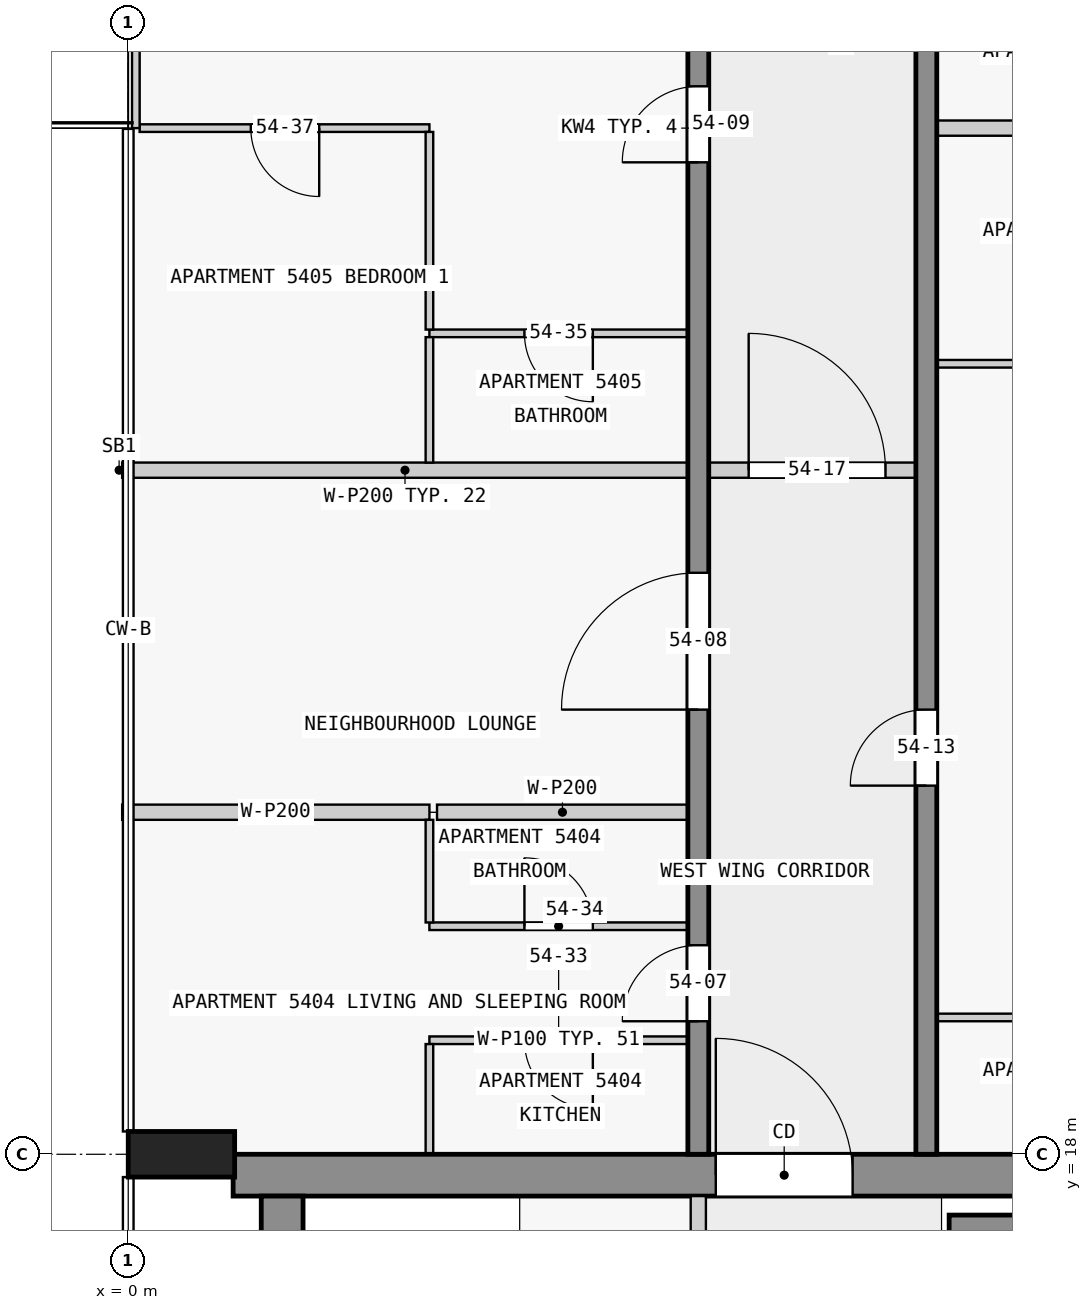
"""IFC4 building model, lengths in metres.
Left out: names, types, materials, properties, quantities, classifications, styles, units other than length and angle.
Written with IfcOpenShell. Run it as: python <this file> out.ifc"""

import sys

from ifc_helpers import new_model, si_unit, direction, frame, frame_2d, origin, origin_2d, place, context, subcontext, project, spatial, rectangle, extrude, element, fill, save


model = new_model("IFC4")
c1 = context("Model", 3, precision=1e-05, world=origin(), true_north=direction((0.0, 1.0)))
c2 = subcontext(c1, "Body", "Model", "MODEL_VIEW")
j1 = project(units=[si_unit("LENGTHUNIT", "METRE"), si_unit("PLANEANGLEUNIT", "RADIAN")], contexts=[c1])
p1 = place(None, origin())
s1 = spatial("IfcSite", under=j1, at=p1, CompositionType="ELEMENT")
p2 = place(p1, origin())
s2 = spatial("IfcBuilding", under=s1, at=p2, CompositionType="ELEMENT")
p3 = place(p2, frame((0.0, 0.0, 208.4)))
s3 = spatial("IfcBuildingStorey", under=s2, at=p3, CompositionType="ELEMENT", Elevation=208.4)
p4 = place(p3, frame((0.7, 18.0, 0.0), z_axis=(0.0, 0.0, 1.0), x_axis=(0.0, 1.0, 0.0)))
e1 = element("IfcColumn", 1, at=p4, inside=s3, PredefinedType="COLUMN", context=c2, shape_type="SweptSolid", body=[
    extrude(rectangle(XDim=0.6, YDim=1.4, at=origin_2d()), origin(), (0.0, 0.0, 1.0), 3.5),
])
p5 = place(p3, frame((1.38, 17.725, 0.0), z_axis=(0.0, 0.0, 1.0), x_axis=(1.0, 0.0, 0.0)))
e2 = element("IfcWall", 2, at=p5, inside=s3, PredefinedType="SHEAR", context=c2, shape_type="SweptSolid", body=[
    extrude(rectangle(XDim=21.12, YDim=0.55, at=frame_2d((10.56, 0.0))), origin(), (0.0, 0.0, 1.0), 3.25),
])
p6 = place(p5, frame((6.35, 0.0, 0.0)))
e3 = element("IfcOpeningElement", 3, at=p6, cuts=e2, PredefinedType="OPENING", context=c2, shape_type="SweptSolid", body=[
    extrude(rectangle(XDim=1.8, YDim=2.1, at=frame_2d((0.9, 1.05))), frame((0.0, 0.285, 0.0), z_axis=(0.0, -1.0, 0.0), x_axis=(1.0, 0.0, 0.0)), (0.0, 0.0, 1.0), 0.57),
])
p7 = place(p3, frame((2.025, 2.5, 0.0), z_axis=(0.0, 0.0, 1.0), x_axis=(0.0, 1.0, 0.0)))
e4 = element("IfcWall", 4, at=p7, inside=s3, PredefinedType="SHEAR", context=c2, shape_type="SweptSolid", body=[
    extrude(rectangle(XDim=14.95, YDim=0.55, at=frame_2d((7.475, 0.0))), origin(), (0.0, 0.0, 1.0), 3.25),
])
p8 = place(p3, frame((10.8, 17.05, 0.0), z_axis=(0.0, 0.0, 1.0), x_axis=(1.0, 0.0, 0.0)))
e5 = element("IfcWall", 5, at=p8, inside=s3, PredefinedType="SHEAR", context=c2, shape_type="SweptSolid", body=[
    extrude(rectangle(XDim=7.8, YDim=0.3, at=frame_2d((3.9, 0.0))), origin(), (0.0, 0.0, 1.0), 3.25),
])
p9 = place(p3, frame((7.5, 18.0, 0.0), z_axis=(0.0, 0.0, 1.0), x_axis=(0.0, 1.0, 0.0)))
e6 = element("IfcWall", 6, at=p9, inside=s3, PredefinedType="SHEAR", context=c2, shape_type="SweptSolid", body=[
    extrude(rectangle(XDim=27.0, YDim=0.275, at=frame_2d((13.5, 0.0))), origin(), (0.0, 0.0, 1.0), 3.25),
])
p10 = place(p9, frame((1.75, 0.0, 0.0)))
e7 = element("IfcOpeningElement", 7, at=p10, cuts=e6, PredefinedType="OPENING", context=c2, shape_type="SweptSolid", body=[
    extrude(rectangle(XDim=1.0, YDim=2.1, at=frame_2d((0.5, 1.05))), frame((0.0, 0.147, 0.0), z_axis=(0.0, -1.0, 0.0), x_axis=(1.0, 0.0, 0.0)), (0.0, 0.0, 1.0), 0.295),
])
p11 = place(p9, frame((5.85, 0.0, 0.0)))
e8 = element("IfcOpeningElement", 8, at=p11, cuts=e6, PredefinedType="OPENING", context=c2, shape_type="SweptSolid", body=[
    extrude(rectangle(XDim=1.8, YDim=2.1, at=frame_2d((0.9, 1.05))), frame((0.0, 0.147, 0.0), z_axis=(0.0, -1.0, 0.0), x_axis=(1.0, 0.0, 0.0)), (0.0, 0.0, 1.0), 0.295),
])
p12 = place(p9, frame((13.05, 0.0, 0.0)))
e9 = element("IfcOpeningElement", 9, at=p12, cuts=e6, PredefinedType="OPENING", context=c2, shape_type="SweptSolid", body=[
    extrude(rectangle(XDim=1.0, YDim=2.1, at=frame_2d((0.5, 1.05))), frame((0.0, 0.147, 0.0), z_axis=(0.0, -1.0, 0.0), x_axis=(1.0, 0.0, 0.0)), (0.0, 0.0, 1.0), 0.295),
])
p13 = place(p9, frame((19.75, 0.0, 0.0)))
e10 = element("IfcOpeningElement", 10, at=p13, cuts=e6, PredefinedType="OPENING", context=c2, shape_type="SweptSolid", body=[
    extrude(rectangle(XDim=1.0, YDim=2.1, at=frame_2d((0.5, 1.05))), frame((0.0, 0.147, 0.0), z_axis=(0.0, -1.0, 0.0), x_axis=(1.0, 0.0, 0.0)), (0.0, 0.0, 1.0), 0.295),
])
p14 = place(p9, frame((23.25, 0.0, 0.0)))
e11 = element("IfcOpeningElement", 11, at=p14, cuts=e6, PredefinedType="OPENING", context=c2, shape_type="SweptSolid", body=[
    extrude(rectangle(XDim=0.9, YDim=2.1, at=frame_2d((0.45, 1.05))), frame((0.0, 0.147, 0.0), z_axis=(0.0, -1.0, 0.0), x_axis=(1.0, 0.0, 0.0)), (0.0, 0.0, 1.0), 0.295),
])
p15 = place(p9, frame((25.45, 0.0, 0.0)))
e12 = element("IfcOpeningElement", 12, at=p15, cuts=e6, PredefinedType="OPENING", context=c2, shape_type="SweptSolid", body=[
    extrude(rectangle(XDim=1.0, YDim=2.1, at=frame_2d((0.5, 1.05))), frame((0.0, 0.147, 0.0), z_axis=(0.0, -1.0, 0.0), x_axis=(1.0, 0.0, 0.0)), (0.0, 0.0, 1.0), 0.295),
])
p16 = place(p3, frame((10.5, 18.0, 0.0), z_axis=(0.0, 0.0, 1.0), x_axis=(0.0, 1.0, 0.0)))
e13 = element("IfcWall", 13, at=p16, inside=s3, PredefinedType="SHEAR", context=c2, shape_type="SweptSolid", body=[
    extrude(rectangle(XDim=27.0, YDim=0.275, at=frame_2d((13.5, 0.0))), origin(), (0.0, 0.0, 1.0), 3.25),
])
p17 = place(p16, frame((4.85, 0.0, 0.0)))
e14 = element("IfcOpeningElement", 14, at=p17, cuts=e13, PredefinedType="OPENING", context=c2, shape_type="SweptSolid", body=[
    extrude(rectangle(XDim=1.0, YDim=2.1, at=frame_2d((0.5, 1.05))), frame((0.0, 0.147, 0.0), z_axis=(0.0, -1.0, 0.0), x_axis=(1.0, 0.0, 0.0)), (0.0, 0.0, 1.0), 0.295),
])
p18 = place(p16, frame((15.25, 0.0, 0.0)))
e15 = element("IfcOpeningElement", 15, at=p18, cuts=e13, PredefinedType="OPENING", context=c2, shape_type="SweptSolid", body=[
    extrude(rectangle(XDim=1.0, YDim=2.1, at=frame_2d((0.5, 1.05))), frame((0.0, 0.147, 0.0), z_axis=(0.0, -1.0, 0.0), x_axis=(1.0, 0.0, 0.0)), (0.0, 0.0, 1.0), 0.295),
])
p19 = place(p16, frame((21.35, 0.0, 0.0)))
e16 = element("IfcOpeningElement", 16, at=p19, cuts=e13, PredefinedType="OPENING", context=c2, shape_type="SweptSolid", body=[
    extrude(rectangle(XDim=1.0, YDim=2.1, at=frame_2d((0.5, 1.05))), frame((0.0, 0.147, 0.0), z_axis=(0.0, -1.0, 0.0), x_axis=(1.0, 0.0, 0.0)), (0.0, 0.0, 1.0), 0.295),
])
p20 = place(p3, frame((0.1, 31.5, 0.0), z_axis=(0.0, 0.0, 1.0), x_axis=(0.0, 1.0, 0.0)))
e17 = element("IfcWall", 17, at=p20, inside=s3, PredefinedType="STANDARD", context=c2, shape_type="SweptSolid", body=[
    extrude(rectangle(XDim=4.5, YDim=0.1, at=frame_2d((2.25, 0.0))), origin(), (0.0, 0.0, 1.0), 3.25),
])
p21 = place(p20, frame((1.05, 0.0, 0.0)))
e18 = element("IfcOpeningElement", 18, at=p21, cuts=e17, PredefinedType="OPENING", context=c2, shape_type="SweptSolid", body=[
    extrude(rectangle(XDim=2.4, YDim=2.4, at=frame_2d((1.2, 1.2))), frame((0.0, 0.06, 0.0), z_axis=(0.0, -1.0, 0.0), x_axis=(1.0, 0.0, 0.0)), (0.0, 0.0, 1.0), 0.12),
])
p22 = place(p3, frame((7.5, 10.1, 0.0), z_axis=(0.0, 0.0, 1.0), x_axis=(0.0, 1.0, 0.0)))
e19 = element("IfcWall", 19, at=p22, inside=s3, PredefinedType="PARTITIONING", context=c2, shape_type="SweptSolid", body=[
    extrude(rectangle(XDim=7.35, YDim=0.2, at=frame_2d((3.675, 0.0))), origin(), (0.0, 0.0, 1.0), 3.25),
])
p23 = place(p22, frame((0.75, 0.0, 0.0)))
e20 = element("IfcOpeningElement", 20, at=p23, cuts=e19, PredefinedType="OPENING", context=c2, shape_type="SweptSolid", body=[
    extrude(rectangle(XDim=0.9, YDim=2.1, at=frame_2d((0.45, 1.05))), frame((0.0, 0.11, 0.0), z_axis=(0.0, -1.0, 0.0), x_axis=(1.0, 0.0, 0.0)), (0.0, 0.0, 1.0), 0.22),
])
p24 = place(p22, frame((4.425, 0.0, 0.0)))
e21 = element("IfcOpeningElement", 21, at=p24, cuts=e19, PredefinedType="OPENING", context=c2, shape_type="SweptSolid", body=[
    extrude(rectangle(XDim=0.9, YDim=2.1, at=frame_2d((0.45, 1.05))), frame((0.0, 0.11, 0.0), z_axis=(0.0, -1.0, 0.0), x_axis=(1.0, 0.0, 0.0)), (0.0, 0.0, 1.0), 0.22),
])
p25 = place(p3, frame((7.363, 19.5, 0.0), z_axis=(0.0, 0.0, 1.0), x_axis=(-1.0, 0.0, 0.0)))
e22 = element("IfcWall", 22, at=p25, inside=s3, PredefinedType="PARTITIONING", context=c2, shape_type="SweptSolid", body=[
    extrude(rectangle(XDim=3.4, YDim=0.1, at=frame_2d((1.7, 0.0))), origin(), (0.0, 0.0, 1.0), 3.25),
])
p26 = place(p25, frame((1.25, 0.0, 0.0)))
e23 = element("IfcOpeningElement", 23, at=p26, cuts=e22, PredefinedType="OPENING", context=c2, shape_type="SweptSolid", body=[
    extrude(rectangle(XDim=0.9, YDim=2.1, at=frame_2d((0.45, 1.05))), frame((0.0, 0.06, 0.0), z_axis=(0.0, -1.0, 0.0), x_axis=(1.0, 0.0, 0.0)), (0.0, 0.0, 1.0), 0.12),
])
p27 = place(p3, frame((14.038, 19.8, 0.0), z_axis=(0.0, 0.0, 1.0), x_axis=(-1.0, 0.0, 0.0)))
e24 = element("IfcWall", 24, at=p27, inside=s3, PredefinedType="PARTITIONING", context=c2, shape_type="SweptSolid", body=[
    extrude(rectangle(XDim=3.4, YDim=0.1, at=frame_2d((1.7, 0.0))), origin(), (0.0, 0.0, 1.0), 3.25),
])
p28 = place(p27, frame((1.25, 0.0, 0.0)))
e25 = element("IfcOpeningElement", 25, at=p28, cuts=e24, PredefinedType="OPENING", context=c2, shape_type="SweptSolid", body=[
    extrude(rectangle(XDim=0.9, YDim=2.1, at=frame_2d((0.45, 1.05))), frame((0.0, 0.06, 0.0), z_axis=(0.0, -1.0, 0.0), x_axis=(1.0, 0.0, 0.0)), (0.0, 0.0, 1.0), 0.12),
])
p29 = place(p3, frame((3.962, 21.0, 0.0), z_axis=(0.0, 0.0, 1.0), x_axis=(1.0, 0.0, 0.0)))
e26 = element("IfcWall", 26, at=p29, inside=s3, PredefinedType="PARTITIONING", context=c2, shape_type="SweptSolid", body=[
    extrude(rectangle(XDim=3.4, YDim=0.1, at=frame_2d((1.7, 0.0))), origin(), (0.0, 0.0, 1.0), 3.25),
])
p30 = place(p29, frame((1.25, 0.0, 0.0)))
e27 = element("IfcOpeningElement", 27, at=p30, cuts=e26, PredefinedType="OPENING", context=c2, shape_type="SweptSolid", body=[
    extrude(rectangle(XDim=0.9, YDim=2.1, at=frame_2d((0.45, 1.05))), frame((0.0, 0.06, 0.0), z_axis=(0.0, -1.0, 0.0), x_axis=(1.0, 0.0, 0.0)), (0.0, 0.0, 1.0), 0.12),
])
p31 = place(p3, frame((7.363, 22.5, 0.0), z_axis=(0.0, 0.0, 1.0), x_axis=(-1.0, 0.0, 0.0)))
e28 = element("IfcWall", 28, at=p31, inside=s3, PredefinedType="PARTITIONING", context=c2, shape_type="SweptSolid", body=[
    extrude(rectangle(XDim=3.3, YDim=0.2, at=frame_2d((1.65, 0.0))), origin(), (0.0, 0.0, 1.0), 3.25),
])
p32 = place(p3, frame((-0.08, 22.5, 0.0), z_axis=(0.0, 0.0, 1.0), x_axis=(1.0, 0.0, 0.0)))
e29 = element("IfcWall", 29, at=p32, inside=s3, PredefinedType="PARTITIONING", context=c2, shape_type="SweptSolid", body=[
    extrude(rectangle(XDim=4.042, YDim=0.2, at=frame_2d((2.021, 0.0))), origin(), (0.0, 0.0, 1.0), 3.25),
])
p33 = place(p3, frame((7.363, 27.0, 0.0), z_axis=(0.0, 0.0, 1.0), x_axis=(-1.0, 0.0, 0.0)))
e30 = element("IfcWall", 30, at=p33, inside=s3, PredefinedType="PARTITIONING", context=c2, shape_type="SweptSolid", body=[
    extrude(rectangle(XDim=7.443, YDim=0.2, at=frame_2d((3.721, 0.0))), origin(), (0.0, 0.0, 1.0), 3.25),
])
p34 = place(p3, frame((10.637, 28.4, 0.0), z_axis=(0.0, 0.0, 1.0), x_axis=(1.0, 0.0, 0.0)))
e31 = element("IfcWall", 31, at=p34, inside=s3, PredefinedType="PARTITIONING", context=c2, shape_type="SweptSolid", body=[
    extrude(rectangle(XDim=3.35, YDim=0.1, at=frame_2d((1.675, 0.0))), origin(), (0.0, 0.0, 1.0), 3.25),
])
p35 = place(p34, frame((1.25, 0.0, 0.0)))
e32 = element("IfcOpeningElement", 32, at=p35, cuts=e31, PredefinedType="OPENING", context=c2, shape_type="SweptSolid", body=[
    extrude(rectangle(XDim=0.9, YDim=2.1, at=frame_2d((0.45, 1.05))), frame((0.0, 0.06, 0.0), z_axis=(0.0, -1.0, 0.0), x_axis=(1.0, 0.0, 0.0)), (0.0, 0.0, 1.0), 0.12),
])
p36 = place(p3, frame((7.363, 28.8, 0.0), z_axis=(0.0, 0.0, 1.0), x_axis=(-1.0, 0.0, 0.0)))
e33 = element("IfcWall", 33, at=p36, inside=s3, PredefinedType="PARTITIONING", context=c2, shape_type="SweptSolid", body=[
    extrude(rectangle(XDim=3.4, YDim=0.1, at=frame_2d((1.7, 0.0))), origin(), (0.0, 0.0, 1.0), 3.25),
])
p37 = place(p36, frame((1.25, 0.0, 0.0)))
e34 = element("IfcOpeningElement", 34, at=p37, cuts=e33, PredefinedType="OPENING", context=c2, shape_type="SweptSolid", body=[
    extrude(rectangle(XDim=0.9, YDim=2.1, at=frame_2d((0.45, 1.05))), frame((0.0, 0.06, 0.0), z_axis=(0.0, -1.0, 0.0), x_axis=(1.0, 0.0, 0.0)), (0.0, 0.0, 1.0), 0.12),
])
p38 = place(p3, frame((3.962, 31.5, 0.0), z_axis=(0.0, 0.0, 1.0), x_axis=(-1.0, 0.0, 0.0)))
e35 = element("IfcWall", 35, at=p38, inside=s3, PredefinedType="PARTITIONING", context=c2, shape_type="SweptSolid", body=[
    extrude(rectangle(XDim=3.812, YDim=0.1, at=frame_2d((1.906, 0.0))), origin(), (0.0, 0.0, 1.0), 3.25),
])
p39 = place(p38, frame((1.45, 0.0, 0.0)))
e36 = element("IfcOpeningElement", 36, at=p39, cuts=e35, PredefinedType="OPENING", context=c2, shape_type="SweptSolid", body=[
    extrude(rectangle(XDim=0.9, YDim=2.1, at=frame_2d((0.45, 1.05))), frame((0.0, 0.06, 0.0), z_axis=(0.0, -1.0, 0.0), x_axis=(1.0, 0.0, 0.0)), (0.0, 0.0, 1.0), 0.12),
])
p40 = place(p3, frame((17.85, 31.5, 0.0), z_axis=(0.0, 0.0, 1.0), x_axis=(-1.0, 0.0, 0.0)))
e37 = element("IfcWall", 37, at=p40, inside=s3, PredefinedType="PARTITIONING", context=c2, shape_type="SweptSolid", body=[
    extrude(rectangle(XDim=7.213, YDim=0.2, at=frame_2d((3.606, 0.0))), origin(), (0.0, 0.0, 1.0), 3.25),
])
p41 = place(p3, frame((3.962, 19.45, 0.0), z_axis=(0.0, 0.0, 1.0), x_axis=(0.0, -1.0, 0.0)))
e38 = element("IfcWall", 38, at=p41, inside=s3, PredefinedType="PARTITIONING", context=c2, shape_type="SweptSolid", body=[
    extrude(rectangle(XDim=1.45, YDim=0.1, at=frame_2d((0.725, 0.0))), origin(), (0.0, 0.0, 1.0), 3.25),
])
p42 = place(p3, frame((3.962, 22.4, 0.0), z_axis=(0.0, 0.0, 1.0), x_axis=(0.0, -1.0, 0.0)))
e39 = element("IfcWall", 39, at=p42, inside=s3, PredefinedType="PARTITIONING", context=c2, shape_type="SweptSolid", body=[
    extrude(rectangle(XDim=1.35, YDim=0.1, at=frame_2d((0.675, 0.0))), origin(), (0.0, 0.0, 1.0), 3.25),
])
p43 = place(p3, frame((3.962, 28.75, 0.0), z_axis=(0.0, 0.0, 1.0), x_axis=(0.0, -1.0, 0.0)))
e40 = element("IfcWall", 40, at=p43, inside=s3, PredefinedType="PARTITIONING", context=c2, shape_type="SweptSolid", body=[
    extrude(rectangle(XDim=1.65, YDim=0.1, at=frame_2d((0.825, 0.0))), origin(), (0.0, 0.0, 1.0), 3.25),
])
p44 = place(p3, frame((3.962, 28.85, 0.0), z_axis=(0.0, 0.0, 1.0), x_axis=(0.0, 1.0, 0.0)))
e41 = element("IfcWall", 41, at=p44, inside=s3, PredefinedType="PARTITIONING", context=c2, shape_type="SweptSolid", body=[
    extrude(rectangle(XDim=2.6, YDim=0.1, at=frame_2d((1.3, 0.0))), origin(), (0.0, 0.0, 1.0), 3.25),
])
p45 = place(p3, frame((7.462, 27.0, 0.0), z_axis=(0.0, 0.0, 1.0), x_axis=(1.0, 0.0, 0.0)))
e42 = element("IfcWall", 42, at=p45, inside=s3, PredefinedType="PARTITIONING", context=c2, shape_type="SweptSolid", body=[
    extrude(rectangle(XDim=3.175, YDim=0.2, at=frame_2d((1.587, 0.0))), origin(), (0.0, 0.0, 1.0), 3.25),
])
p46 = place(p45, frame((0.7, 0.0, 0.0)))
e43 = element("IfcOpeningElement", 43, at=p46, cuts=e42, PredefinedType="OPENING", context=c2, shape_type="SweptSolid", body=[
    extrude(rectangle(XDim=1.8, YDim=2.1, at=frame_2d((0.9, 1.05))), frame((0.0, 0.11, 0.0), z_axis=(0.0, -1.0, 0.0), x_axis=(1.0, 0.0, 0.0)), (0.0, 0.0, 1.0), 0.22),
])
p47 = place(p6, origin())
e44 = element("IfcDoor", 44, at=p47, inside=s3, OperationType="DOUBLE_DOOR_SINGLE_SWING", PredefinedType="DOOR", context=c2, shape_type="SweptSolid", body=[
    extrude(rectangle(XDim=1.8, YDim=2.1, at=frame_2d((0.9, 1.05))), frame((0.0, 0.025, 0.0), z_axis=(0.0, -1.0, 0.0), x_axis=(1.0, 0.0, 0.0)), (0.0, 0.0, 1.0), 0.05),
])
fill(e3, e44)
p48 = place(p10, origin())
e45 = element("IfcDoor", 45, at=p48, inside=s3, OperationType="SINGLE_SWING_LEFT", PredefinedType="DOOR", context=c2, shape_type="SweptSolid", body=[
    extrude(rectangle(XDim=1.0, YDim=2.1, at=frame_2d((0.5, 1.05))), frame((0.0, 0.025, 0.0), z_axis=(0.0, -1.0, 0.0), x_axis=(1.0, 0.0, 0.0)), (0.0, 0.0, 1.0), 0.05),
])
fill(e7, e45)
p49 = place(p11, origin())
e46 = element("IfcDoor", 46, at=p49, inside=s3, OperationType="SINGLE_SWING_LEFT", PredefinedType="DOOR", context=c2, shape_type="SweptSolid", body=[
    extrude(rectangle(XDim=1.8, YDim=2.1, at=frame_2d((0.9, 1.05))), frame((0.0, 0.025, 0.0), z_axis=(0.0, -1.0, 0.0), x_axis=(1.0, 0.0, 0.0)), (0.0, 0.0, 1.0), 0.05),
])
fill(e8, e46)
p50 = place(p12, origin())
e47 = element("IfcDoor", 47, at=p50, inside=s3, OperationType="SINGLE_SWING_RIGHT", PredefinedType="DOOR", context=c2, shape_type="SweptSolid", body=[
    extrude(rectangle(XDim=1.0, YDim=2.1, at=frame_2d((0.5, 1.05))), frame((0.0, 0.025, 0.0), z_axis=(0.0, -1.0, 0.0), x_axis=(1.0, 0.0, 0.0)), (0.0, 0.0, 1.0), 0.05),
])
fill(e9, e47)
p51 = place(p17, origin())
e48 = element("IfcDoor", 48, at=p51, inside=s3, OperationType="SINGLE_SWING_LEFT", PredefinedType="DOOR", context=c2, shape_type="SweptSolid", body=[
    extrude(rectangle(XDim=1.0, YDim=2.1, at=frame_2d((0.5, 1.05))), frame((0.0, 0.025, 0.0), z_axis=(0.0, -1.0, 0.0), x_axis=(1.0, 0.0, 0.0)), (0.0, 0.0, 1.0), 0.05),
])
fill(e14, e48)
p52 = place(p46, origin())
e49 = element("IfcDoor", 49, at=p52, inside=s3, OperationType="SINGLE_SWING_RIGHT", PredefinedType="DOOR", context=c2, shape_type="SweptSolid", body=[
    extrude(rectangle(XDim=1.8, YDim=2.1, at=frame_2d((0.9, 1.05))), frame((0.0, 0.025, 0.0), z_axis=(0.0, -1.0, 0.0), x_axis=(1.0, 0.0, 0.0)), (0.0, 0.0, 1.0), 0.05),
])
fill(e43, e49)
p53 = place(p26, origin())
e50 = element("IfcDoor", 50, at=p53, inside=s3, OperationType="SINGLE_SWING_LEFT", PredefinedType="DOOR", context=c2, shape_type="SweptSolid", body=[
    extrude(rectangle(XDim=0.9, YDim=2.1, at=frame_2d((0.45, 1.05))), frame((0.0, 0.025, 0.0), z_axis=(0.0, -1.0, 0.0), x_axis=(1.0, 0.0, 0.0)), (0.0, 0.0, 1.0), 0.05),
])
fill(e23, e50)
p54 = place(p30, origin())
e51 = element("IfcDoor", 51, at=p54, inside=s3, OperationType="SINGLE_SWING_LEFT", PredefinedType="DOOR", context=c2, shape_type="SweptSolid", body=[
    extrude(rectangle(XDim=0.9, YDim=2.1, at=frame_2d((0.45, 1.05))), frame((0.0, 0.025, 0.0), z_axis=(0.0, -1.0, 0.0), x_axis=(1.0, 0.0, 0.0)), (0.0, 0.0, 1.0), 0.05),
])
fill(e27, e51)
p55 = place(p37, origin())
e52 = element("IfcDoor", 52, at=p55, inside=s3, OperationType="SINGLE_SWING_LEFT", PredefinedType="DOOR", context=c2, shape_type="SweptSolid", body=[
    extrude(rectangle(XDim=0.9, YDim=2.1, at=frame_2d((0.45, 1.05))), frame((0.0, 0.025, 0.0), z_axis=(0.0, -1.0, 0.0), x_axis=(1.0, 0.0, 0.0)), (0.0, 0.0, 1.0), 0.05),
])
fill(e34, e52)
p56 = place(p39, origin())
e53 = element("IfcDoor", 53, at=p56, inside=s3, OperationType="SINGLE_SWING_LEFT", PredefinedType="DOOR", context=c2, shape_type="SweptSolid", body=[
    extrude(rectangle(XDim=0.9, YDim=2.1, at=frame_2d((0.45, 1.05))), frame((0.0, 0.025, 0.0), z_axis=(0.0, -1.0, 0.0), x_axis=(1.0, 0.0, 0.0)), (0.0, 0.0, 1.0), 0.05),
])
fill(e36, e53)
save(model, sys.argv[1])
